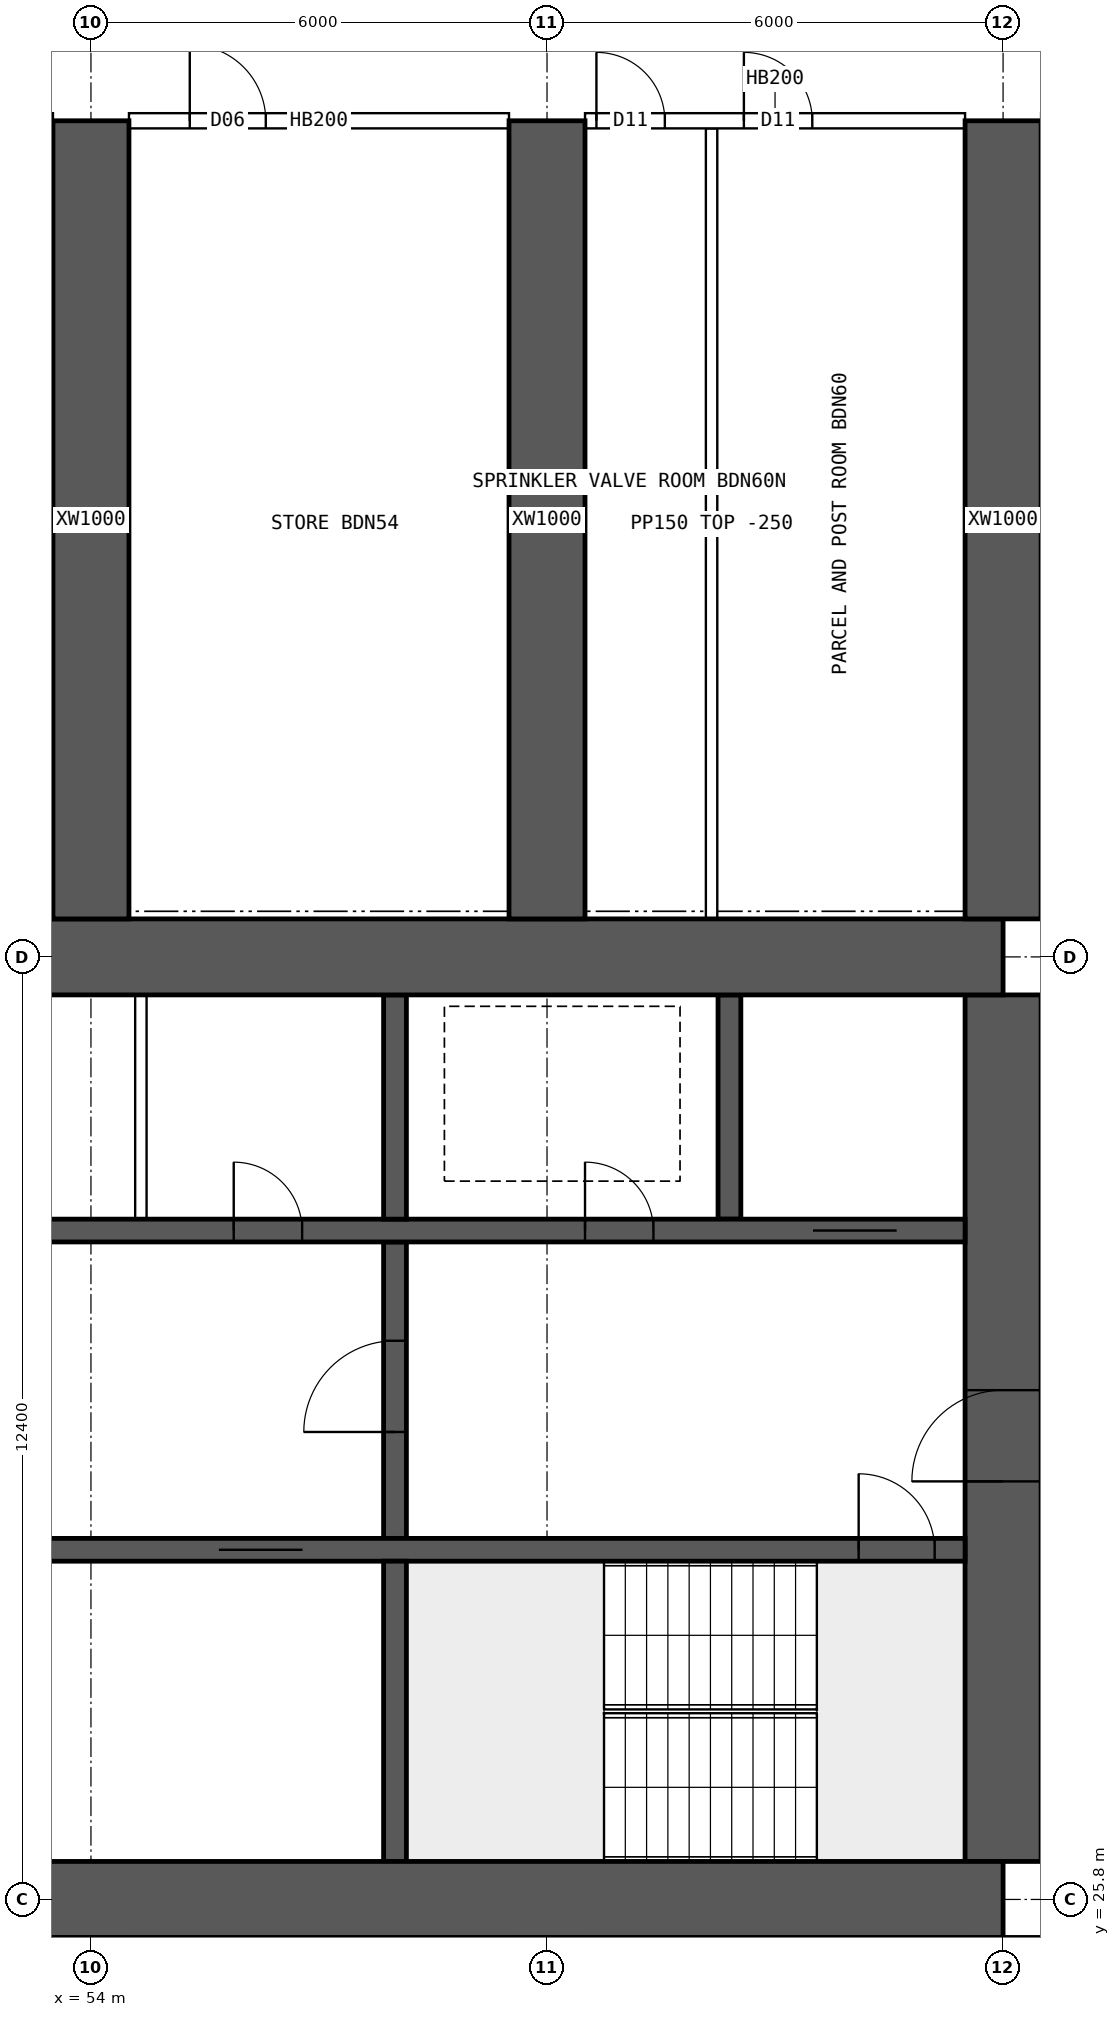
"""IFC4 building model, lengths in metres.
Left out: names, types, materials, properties, quantities, classifications, styles, units other than length and angle.
Written with IfcOpenShell. Run it as: python <this file> out.ifc"""

import sys

from ifc_helpers import new_model, si_unit, direction, frame, frame_2d, origin, place, context, subcontext, project, spatial, rectangle, extrude, element, fill, save


model = new_model("IFC4")
c1 = context("Model", 3, precision=1e-05, world=origin(), true_north=direction((0.0, 1.0)))
c2 = subcontext(c1, "Body", "Model", "MODEL_VIEW")
j1 = project(units=[si_unit("LENGTHUNIT", "METRE"), si_unit("PLANEANGLEUNIT", "RADIAN")], contexts=[c1])
p1 = place(None, origin())
s1 = spatial("IfcSite", under=j1, at=p1, CompositionType="ELEMENT")
p2 = place(p1, origin())
s2 = spatial("IfcBuilding", under=s1, at=p2, CompositionType="ELEMENT")
p3 = place(p2, frame((0.0, 0.0, 53.95)))
s3 = spatial("IfcBuildingStorey", under=s2, at=p3, CompositionType="ELEMENT", Elevation=53.95)
for number, where, z_axis, x_axis in (
    (1, (18.0, 25.8, 0.0), (0.0, 0.0, 1.0), (1.0, 0.0, 0.0)),
    (2, (18.0, 38.2, 0.0), (0.0, 0.0, 1.0), (1.0, 0.0, 0.0)),
):
    element("IfcWall", number, at=place(p3, frame(where, z_axis=z_axis, x_axis=x_axis)), inside=s3, PredefinedType="SHEAR", context=c2, shape_type="SweptSolid", body=[
        extrude(rectangle(XDim=48.0, YDim=1.0, at=frame_2d((24.0, 0.0))), origin(), (0.0, 0.0, 1.0), 3.75),
    ])
p4 = place(p3, frame((66.0, 26.3, 0.0), z_axis=(0.0, 0.0, 1.0), x_axis=(0.0, 1.0, 0.0)))
e3 = element("IfcWall", 3, at=p4, inside=s3, PredefinedType="SHEAR", context=c2, shape_type="SweptSolid", body=[
    extrude(rectangle(XDim=11.4, YDim=1.0, at=frame_2d((5.7, 0.0))), origin(), (0.0, 0.0, 1.0), 3.75),
])
p5 = place(p4, frame((5.0, 0.0, 0.0)))
e4 = element("IfcOpeningElement", 4, at=p5, cuts=e3, PredefinedType="OPENING", context=c2, shape_type="SweptSolid", body=[
    extrude(rectangle(XDim=1.2, YDim=2.1, at=frame_2d((0.6, 1.05))), frame((0.0, 0.51, 0.0), z_axis=(0.0, -1.0, 0.0), x_axis=(1.0, 0.0, 0.0)), (0.0, 0.0, 1.0), 1.02),
])
p6 = place(p3, frame((18.5, 30.4, 0.0), z_axis=(0.0, 0.0, 1.0), x_axis=(1.0, 0.0, 0.0)))
e5 = element("IfcWall", 5, at=p6, inside=s3, PredefinedType="SHEAR", context=c2, shape_type="SweptSolid", body=[
    extrude(rectangle(XDim=47.0, YDim=0.3, at=frame_2d((23.5, 0.0))), origin(), (0.0, 0.0, 1.0), 3.75),
])
p7 = place(p6, frame((0.4, 0.0, 0.0)))
e6 = element("IfcOpeningElement", 6, at=p7, cuts=e5, PredefinedType="OPENING", context=c2, shape_type="SweptSolid", body=[
    extrude(rectangle(XDim=1.0, YDim=2.1, at=frame_2d((0.5, 1.05))), frame((0.0, 0.16, 0.0), z_axis=(0.0, -1.0, 0.0), x_axis=(1.0, 0.0, 0.0)), (0.0, 0.0, 1.0), 0.32),
])
p8 = place(p6, frame((45.6, 0.0, 0.0)))
e7 = element("IfcOpeningElement", 7, at=p8, cuts=e5, PredefinedType="OPENING", context=c2, shape_type="SweptSolid", body=[
    extrude(rectangle(XDim=1.0, YDim=2.1, at=frame_2d((0.5, 1.05))), frame((0.0, 0.16, 0.0), z_axis=(0.0, -1.0, 0.0), x_axis=(1.0, 0.0, 0.0)), (0.0, 0.0, 1.0), 0.32),
])
p9 = place(p6, frame((8.25, 0.0, 0.0)))
e8 = element("IfcOpeningElement", 8, at=p9, cuts=e5, PredefinedType="OPENING", context=c2, shape_type="SweptSolid", body=[
    extrude(rectangle(XDim=1.1, YDim=2.1, at=frame_2d((0.55, 1.05))), frame((0.0, 0.16, 0.0), z_axis=(0.0, -1.0, 0.0), x_axis=(1.0, 0.0, 0.0)), (0.0, 0.0, 1.0), 0.32),
])
p10 = place(p6, frame((10.85, 0.0, 0.0)))
e9 = element("IfcOpeningElement", 9, at=p10, cuts=e5, PredefinedType="OPENING", context=c2, shape_type="SweptSolid", body=[
    extrude(rectangle(XDim=1.1, YDim=2.1, at=frame_2d((0.55, 1.05))), frame((0.0, 0.16, 0.0), z_axis=(0.0, -1.0, 0.0), x_axis=(1.0, 0.0, 0.0)), (0.0, 0.0, 1.0), 0.32),
])
p11 = place(p6, frame((13.45, 0.0, 0.0)))
e10 = element("IfcOpeningElement", 10, at=p11, cuts=e5, PredefinedType="OPENING", context=c2, shape_type="SweptSolid", body=[
    extrude(rectangle(XDim=1.1, YDim=2.1, at=frame_2d((0.55, 1.05))), frame((0.0, 0.16, 0.0), z_axis=(0.0, -1.0, 0.0), x_axis=(1.0, 0.0, 0.0)), (0.0, 0.0, 1.0), 0.32),
])
p12 = place(p6, frame((16.05, 0.0, 0.0)))
e11 = element("IfcOpeningElement", 11, at=p12, cuts=e5, PredefinedType="OPENING", context=c2, shape_type="SweptSolid", body=[
    extrude(rectangle(XDim=1.1, YDim=2.1, at=frame_2d((0.55, 1.05))), frame((0.0, 0.16, 0.0), z_axis=(0.0, -1.0, 0.0), x_axis=(1.0, 0.0, 0.0)), (0.0, 0.0, 1.0), 0.32),
])
p13 = place(p6, frame((30.117, 0.0, 0.0)))
e12 = element("IfcOpeningElement", 12, at=p13, cuts=e5, PredefinedType="OPENING", context=c2, shape_type="SweptSolid", body=[
    extrude(rectangle(XDim=1.1, YDim=2.1, at=frame_2d((0.55, 1.05))), frame((0.0, 0.16, 0.0), z_axis=(0.0, -1.0, 0.0), x_axis=(1.0, 0.0, 0.0)), (0.0, 0.0, 1.0), 0.32),
])
p14 = place(p6, frame((33.65, 0.0, 0.0)))
e13 = element("IfcOpeningElement", 13, at=p14, cuts=e5, PredefinedType="OPENING", context=c2, shape_type="SweptSolid", body=[
    extrude(rectangle(XDim=1.1, YDim=2.1, at=frame_2d((0.55, 1.05))), frame((0.0, 0.16, 0.0), z_axis=(0.0, -1.0, 0.0), x_axis=(1.0, 0.0, 0.0)), (0.0, 0.0, 1.0), 0.32),
])
p15 = place(p6, frame((37.183, 0.0, 0.0)))
e14 = element("IfcOpeningElement", 14, at=p15, cuts=e5, PredefinedType="OPENING", context=c2, shape_type="SweptSolid", body=[
    extrude(rectangle(XDim=1.1, YDim=2.1, at=frame_2d((0.55, 1.05))), frame((0.0, 0.16, 0.0), z_axis=(0.0, -1.0, 0.0), x_axis=(1.0, 0.0, 0.0)), (0.0, 0.0, 1.0), 0.32),
])
p16 = place(p3, frame((18.5, 34.6, 0.0), z_axis=(0.0, 0.0, 1.0), x_axis=(1.0, 0.0, 0.0)))
e15 = element("IfcWall", 15, at=p16, inside=s3, PredefinedType="SHEAR", context=c2, shape_type="SweptSolid", body=[
    extrude(rectangle(XDim=47.0, YDim=0.3, at=frame_2d((23.5, 0.0))), origin(), (0.0, 0.0, 1.0), 3.75),
])
p17 = place(p16, frame((0.9, 0.0, 0.0)))
e16 = element("IfcOpeningElement", 16, at=p17, cuts=e15, PredefinedType="OPENING", context=c2, shape_type="SweptSolid", body=[
    extrude(rectangle(XDim=1.1, YDim=2.1, at=frame_2d((0.55, 1.05))), frame((0.0, 0.16, 0.0), z_axis=(0.0, -1.0, 0.0), x_axis=(1.0, 0.0, 0.0)), (0.0, 0.0, 1.0), 0.32),
])
p18 = place(p16, frame((45.0, 0.0, 0.0)))
e17 = element("IfcOpeningElement", 17, at=p18, cuts=e15, PredefinedType="OPENING", context=c2, shape_type="SweptSolid", body=[
    extrude(rectangle(XDim=1.1, YDim=2.1, at=frame_2d((0.55, 1.05))), frame((0.0, 0.16, 0.0), z_axis=(0.0, -1.0, 0.0), x_axis=(1.0, 0.0, 0.0)), (0.0, 0.0, 1.0), 0.32),
])
p19 = place(p16, frame((4.1, 0.0, 0.0)))
e18 = element("IfcOpeningElement", 18, at=p19, cuts=e15, PredefinedType="OPENING", context=c2, shape_type="SweptSolid", body=[
    extrude(rectangle(XDim=0.9, YDim=2.1, at=frame_2d((0.45, 1.05))), frame((0.0, 0.16, 0.0), z_axis=(0.0, -1.0, 0.0), x_axis=(1.0, 0.0, 0.0)), (0.0, 0.0, 1.0), 0.32),
])
p20 = place(p16, frame((42.0, 0.0, 0.0)))
e19 = element("IfcOpeningElement", 19, at=p20, cuts=e15, PredefinedType="OPENING", context=c2, shape_type="SweptSolid", body=[
    extrude(rectangle(XDim=0.9, YDim=2.1, at=frame_2d((0.45, 1.05))), frame((0.0, 0.16, 0.0), z_axis=(0.0, -1.0, 0.0), x_axis=(1.0, 0.0, 0.0)), (0.0, 0.0, 1.0), 0.32),
])
p21 = place(p16, frame((8.875, 0.0, 0.0)))
e20 = element("IfcOpeningElement", 20, at=p21, cuts=e15, PredefinedType="OPENING", context=c2, shape_type="SweptSolid", body=[
    extrude(rectangle(XDim=0.9, YDim=2.1, at=frame_2d((0.45, 1.05))), frame((0.0, 0.16, 0.0), z_axis=(0.0, -1.0, 0.0), x_axis=(1.0, 0.0, 0.0)), (0.0, 0.0, 1.0), 0.32),
])
p22 = place(p16, frame((12.849, 0.0, 0.0)))
e21 = element("IfcOpeningElement", 21, at=p22, cuts=e15, PredefinedType="OPENING", context=c2, shape_type="SweptSolid", body=[
    extrude(rectangle(XDim=0.9, YDim=2.1, at=frame_2d((0.45, 1.05))), frame((0.0, 0.16, 0.0), z_axis=(0.0, -1.0, 0.0), x_axis=(1.0, 0.0, 0.0)), (0.0, 0.0, 1.0), 0.32),
])
p23 = place(p16, frame((16.496, 0.0, 0.0)))
e22 = element("IfcOpeningElement", 22, at=p23, cuts=e15, PredefinedType="OPENING", context=c2, shape_type="SweptSolid", body=[
    extrude(rectangle(XDim=0.9, YDim=2.1, at=frame_2d((0.45, 1.05))), frame((0.0, 0.16, 0.0), z_axis=(0.0, -1.0, 0.0), x_axis=(1.0, 0.0, 0.0)), (0.0, 0.0, 1.0), 0.32),
])
p24 = place(p16, frame((20.255, 0.0, 0.0)))
e23 = element("IfcOpeningElement", 23, at=p24, cuts=e15, PredefinedType="OPENING", context=c2, shape_type="SweptSolid", body=[
    extrude(rectangle(XDim=0.9, YDim=2.1, at=frame_2d((0.45, 1.05))), frame((0.0, 0.16, 0.0), z_axis=(0.0, -1.0, 0.0), x_axis=(1.0, 0.0, 0.0)), (0.0, 0.0, 1.0), 0.32),
])
p25 = place(p16, frame((24.661, 0.0, 0.0)))
e24 = element("IfcOpeningElement", 24, at=p25, cuts=e15, PredefinedType="OPENING", context=c2, shape_type="SweptSolid", body=[
    extrude(rectangle(XDim=0.9, YDim=2.1, at=frame_2d((0.45, 1.05))), frame((0.0, 0.16, 0.0), z_axis=(0.0, -1.0, 0.0), x_axis=(1.0, 0.0, 0.0)), (0.0, 0.0, 1.0), 0.32),
])
p26 = place(p16, frame((27.458, 0.0, 0.0)))
e25 = element("IfcOpeningElement", 25, at=p26, cuts=e15, PredefinedType="OPENING", context=c2, shape_type="SweptSolid", body=[
    extrude(rectangle(XDim=0.9, YDim=2.1, at=frame_2d((0.45, 1.05))), frame((0.0, 0.16, 0.0), z_axis=(0.0, -1.0, 0.0), x_axis=(1.0, 0.0, 0.0)), (0.0, 0.0, 1.0), 0.32),
])
p27 = place(p16, frame((29.628, 0.0, 0.0)))
e26 = element("IfcOpeningElement", 26, at=p27, cuts=e15, PredefinedType="OPENING", context=c2, shape_type="SweptSolid", body=[
    extrude(rectangle(XDim=0.9, YDim=2.1, at=frame_2d((0.45, 1.05))), frame((0.0, 0.16, 0.0), z_axis=(0.0, -1.0, 0.0), x_axis=(1.0, 0.0, 0.0)), (0.0, 0.0, 1.0), 0.32),
])
p28 = place(p16, frame((33.427, 0.0, 0.0)))
e27 = element("IfcOpeningElement", 27, at=p28, cuts=e15, PredefinedType="OPENING", context=c2, shape_type="SweptSolid", body=[
    extrude(rectangle(XDim=0.9, YDim=2.1, at=frame_2d((0.45, 1.05))), frame((0.0, 0.16, 0.0), z_axis=(0.0, -1.0, 0.0), x_axis=(1.0, 0.0, 0.0)), (0.0, 0.0, 1.0), 0.32),
])
p29 = place(p16, frame((37.378, 0.0, 0.0)))
e28 = element("IfcOpeningElement", 28, at=p29, cuts=e15, PredefinedType="OPENING", context=c2, shape_type="SweptSolid", body=[
    extrude(rectangle(XDim=0.9, YDim=2.1, at=frame_2d((0.45, 1.05))), frame((0.0, 0.16, 0.0), z_axis=(0.0, -1.0, 0.0), x_axis=(1.0, 0.0, 0.0)), (0.0, 0.0, 1.0), 0.32),
])
p30 = place(p3, frame((58.0, 26.3, 0.0), z_axis=(0.0, 0.0, 1.0), x_axis=(0.0, 1.0, 0.0)))
e29 = element("IfcWall", 29, at=p30, inside=s3, PredefinedType="SHEAR", context=c2, shape_type="SweptSolid", body=[
    extrude(rectangle(XDim=3.95, YDim=0.3, at=frame_2d((1.975, 0.0))), origin(), (0.0, 0.0, 1.0), 3.75),
])
p31 = place(p3, frame((58.0, 30.55, 0.0), z_axis=(0.0, 0.0, 1.0), x_axis=(0.0, 1.0, 0.0)))
e30 = element("IfcWall", 30, at=p31, inside=s3, PredefinedType="SHEAR", context=c2, shape_type="SweptSolid", body=[
    extrude(rectangle(XDim=3.9, YDim=0.3, at=frame_2d((1.95, 0.0))), origin(), (0.0, 0.0, 1.0), 3.75),
])
p32 = place(p31, frame((1.4, 0.0, 0.0)))
e31 = element("IfcOpeningElement", 31, at=p32, cuts=e30, PredefinedType="OPENING", context=c2, shape_type="SweptSolid", body=[
    extrude(rectangle(XDim=1.2, YDim=2.1, at=frame_2d((0.6, 1.05))), frame((0.0, 0.16, 0.0), z_axis=(0.0, -1.0, 0.0), x_axis=(1.0, 0.0, 0.0)), (0.0, 0.0, 1.0), 0.32),
])
for number, where, z_axis, x_axis in (
    (32, (62.4, 34.75, 0.0), (0.0, 0.0, 1.0), (0.0, 1.0, 0.0)),
    (33, (58.0, 34.75, 0.0), (0.0, 0.0, 1.0), (0.0, 1.0, 0.0)),
):
    element("IfcWall", number, at=place(p3, frame(where, z_axis=z_axis, x_axis=x_axis)), inside=s3, PredefinedType="SHEAR", context=c2, shape_type="SweptSolid", body=[
        extrude(rectangle(XDim=2.95, YDim=0.3, at=frame_2d((1.475, 0.0))), origin(), (0.0, 0.0, 1.0), 3.75),
    ])
for number, where, z_axis, x_axis in (
    (34, (54.0, 38.7, 0.0), (0.0, 0.0, 1.0), (0.0, 1.0, 0.0)),
    (35, (60.0, 38.7, 0.0), (0.0, 0.0, 1.0), (0.0, 1.0, 0.0)),
    (36, (66.0, 38.7, 0.0), (0.0, 0.0, 1.0), (0.0, 1.0, 0.0)),
):
    element("IfcWall", number, at=place(p3, frame(where, z_axis=z_axis, x_axis=x_axis)), inside=s3, PredefinedType="SHEAR", context=c2, shape_type="SweptSolid", body=[
        extrude(rectangle(XDim=10.5, YDim=1.0, at=frame_2d((5.25, 0.0))), origin(), (0.0, 0.0, 1.0), 3.75),
    ])
p33 = place(p3, frame((54.657, 34.75, 0.0), z_axis=(0.0, 0.0, 1.0), x_axis=(0.0, 1.0, 0.0)))
e37 = element("IfcWall", 37, at=p33, inside=s3, PredefinedType="SOLIDWALL", context=c2, shape_type="SweptSolid", body=[
    extrude(rectangle(XDim=2.95, YDim=0.15, at=frame_2d((1.475, 0.0))), origin(), (0.0, 0.0, 1.0), 3.5),
])
p34 = place(p3, frame((54.5, 49.2, 0.0), z_axis=(0.0, 0.0, 1.0), x_axis=(1.0, 0.0, 0.0)))
e38 = element("IfcWall", 38, at=p34, inside=s3, PredefinedType="SOLIDWALL", context=c2, shape_type="SweptSolid", body=[
    extrude(rectangle(XDim=5.0, YDim=0.2, at=frame_2d((2.5, 0.0))), origin(), (0.0, 0.0, 1.0), 3.5),
])
p35 = place(p34, frame((0.8, 0.0, 0.0)))
e39 = element("IfcOpeningElement", 39, at=p35, cuts=e38, PredefinedType="OPENING", context=c2, shape_type="SweptSolid", body=[
    extrude(rectangle(XDim=1.0, YDim=2.1, at=frame_2d((0.5, 1.05))), frame((0.0, 0.11, 0.0), z_axis=(0.0, -1.0, 0.0), x_axis=(1.0, 0.0, 0.0)), (0.0, 0.0, 1.0), 0.22),
])
p36 = place(p3, frame((60.5, 49.2, 0.0), z_axis=(0.0, 0.0, 1.0), x_axis=(1.0, 0.0, 0.0)))
e40 = element("IfcWall", 40, at=p36, inside=s3, PredefinedType="SOLIDWALL", context=c2, shape_type="SweptSolid", body=[
    extrude(rectangle(XDim=5.0, YDim=0.2, at=frame_2d((2.5, 0.0))), origin(), (0.0, 0.0, 1.0), 3.5),
])
p37 = place(p36, frame((0.15, 0.0, 0.0)))
e41 = element("IfcOpeningElement", 41, at=p37, cuts=e40, PredefinedType="OPENING", context=c2, shape_type="SweptSolid", body=[
    extrude(rectangle(XDim=0.9, YDim=2.1, at=frame_2d((0.45, 1.05))), frame((0.0, 0.11, 0.0), z_axis=(0.0, -1.0, 0.0), x_axis=(1.0, 0.0, 0.0)), (0.0, 0.0, 1.0), 0.22),
])
p38 = place(p36, frame((2.09, 0.0, 0.0)))
e42 = element("IfcOpeningElement", 42, at=p38, cuts=e40, PredefinedType="OPENING", context=c2, shape_type="SweptSolid", body=[
    extrude(rectangle(XDim=0.9, YDim=2.1, at=frame_2d((0.45, 1.05))), frame((0.0, 0.11, 0.0), z_axis=(0.0, -1.0, 0.0), x_axis=(1.0, 0.0, 0.0)), (0.0, 0.0, 1.0), 0.22),
])
for number, where, z_axis, x_axis in (
    (43, (56.66, 14.9, 0.0), (0.0, 0.0, 1.0), (0.0, 1.0, 0.0)),
    (44, (62.095, 14.9, 0.0), (0.0, 0.0, 1.0), (0.0, 1.0, 0.0)),
    (45, (62.165, 38.7, 0.0), (0.0, 0.0, 1.0), (0.0, 1.0, 0.0)),
):
    element("IfcWall", number, at=place(p3, frame(where, z_axis=z_axis, x_axis=x_axis)), inside=s3, PredefinedType="PARTITIONING", context=c2, shape_type="SweptSolid", body=[
        extrude(rectangle(XDim=10.4, YDim=0.15, at=frame_2d((5.2, 0.0))), origin(), (0.0, 0.0, 1.0), 3.5),
    ])
p39 = place(p5, origin())
e46 = element("IfcDoor", 46, at=p39, inside=s3, OperationType="SINGLE_SWING_LEFT", PredefinedType="DOOR", context=c2, shape_type="SweptSolid", body=[
    extrude(rectangle(XDim=1.2, YDim=2.1, at=frame_2d((0.6, 1.05))), frame((0.0, 0.025, 0.0), z_axis=(0.0, -1.0, 0.0), x_axis=(1.0, 0.0, 0.0)), (0.0, 0.0, 1.0), 0.05),
])
fill(e4, e46)
p40 = place(p8, origin())
e47 = element("IfcDoor", 47, at=p40, inside=s3, OperationType="SINGLE_SWING_LEFT", PredefinedType="DOOR", context=c2, shape_type="SweptSolid", body=[
    extrude(rectangle(XDim=1.0, YDim=2.1, at=frame_2d((0.5, 1.05))), frame((0.0, 0.025, 0.0), z_axis=(0.0, -1.0, 0.0), x_axis=(1.0, 0.0, 0.0)), (0.0, 0.0, 1.0), 0.05),
])
fill(e7, e47)
p41 = place(p18, origin())
e48 = element("IfcDoor", 48, at=p41, inside=s3, OperationType="DOUBLE_DOOR_SLIDING", PredefinedType="DOOR", context=c2, shape_type="SweptSolid", body=[
    extrude(rectangle(XDim=1.1, YDim=2.1, at=frame_2d((0.55, 1.05))), frame((0.0, 0.025, 0.0), z_axis=(0.0, -1.0, 0.0), x_axis=(1.0, 0.0, 0.0)), (0.0, 0.0, 1.0), 0.05),
])
fill(e17, e48)
p42 = place(p20, origin())
e49 = element("IfcDoor", 49, at=p42, inside=s3, OperationType="SINGLE_SWING_LEFT", PredefinedType="DOOR", context=c2, shape_type="SweptSolid", body=[
    extrude(rectangle(XDim=0.9, YDim=2.1, at=frame_2d((0.45, 1.05))), frame((0.0, 0.025, 0.0), z_axis=(0.0, -1.0, 0.0), x_axis=(1.0, 0.0, 0.0)), (0.0, 0.0, 1.0), 0.05),
])
fill(e19, e49)
p43 = place(p32, origin())
e50 = element("IfcDoor", 50, at=p43, inside=s3, OperationType="SINGLE_SWING_LEFT", PredefinedType="DOOR", context=c2, shape_type="SweptSolid", body=[
    extrude(rectangle(XDim=1.2, YDim=2.1, at=frame_2d((0.6, 1.05))), frame((0.0, 0.025, 0.0), z_axis=(0.0, -1.0, 0.0), x_axis=(1.0, 0.0, 0.0)), (0.0, 0.0, 1.0), 0.05),
])
fill(e31, e50)
p44 = place(p29, origin())
e51 = element("IfcDoor", 51, at=p44, inside=s3, OperationType="SINGLE_SWING_LEFT", PredefinedType="DOOR", context=c2, shape_type="SweptSolid", body=[
    extrude(rectangle(XDim=0.9, YDim=2.1, at=frame_2d((0.45, 1.05))), frame((0.0, 0.025, 0.0), z_axis=(0.0, -1.0, 0.0), x_axis=(1.0, 0.0, 0.0)), (0.0, 0.0, 1.0), 0.05),
])
fill(e28, e51)
p45 = place(p15, origin())
e52 = element("IfcDoor", 52, at=p45, inside=s3, OperationType="DOUBLE_DOOR_SLIDING", PredefinedType="DOOR", context=c2, shape_type="SweptSolid", body=[
    extrude(rectangle(XDim=1.1, YDim=2.1, at=frame_2d((0.55, 1.05))), frame((0.0, 0.025, 0.0), z_axis=(0.0, -1.0, 0.0), x_axis=(1.0, 0.0, 0.0)), (0.0, 0.0, 1.0), 0.05),
])
fill(e14, e52)
p46 = place(p35, origin())
e53 = element("IfcDoor", 53, at=p46, inside=s3, OperationType="SINGLE_SWING_LEFT", PredefinedType="DOOR", context=c2, shape_type="SweptSolid", body=[
    extrude(rectangle(XDim=1.0, YDim=2.1, at=frame_2d((0.5, 1.05))), frame((0.0, 0.025, 0.0), z_axis=(0.0, -1.0, 0.0), x_axis=(1.0, 0.0, 0.0)), (0.0, 0.0, 1.0), 0.05),
])
fill(e39, e53)
p47 = place(p37, origin())
e54 = element("IfcDoor", 54, at=p47, inside=s3, OperationType="SINGLE_SWING_LEFT", PredefinedType="DOOR", context=c2, shape_type="SweptSolid", body=[
    extrude(rectangle(XDim=0.9, YDim=2.1, at=frame_2d((0.45, 1.05))), frame((0.0, 0.025, 0.0), z_axis=(0.0, -1.0, 0.0), x_axis=(1.0, 0.0, 0.0)), (0.0, 0.0, 1.0), 0.05),
])
fill(e41, e54)
p48 = place(p38, origin())
e55 = element("IfcDoor", 55, at=p48, inside=s3, OperationType="SINGLE_SWING_LEFT", PredefinedType="DOOR", context=c2, shape_type="SweptSolid", body=[
    extrude(rectangle(XDim=0.9, YDim=2.1, at=frame_2d((0.45, 1.05))), frame((0.0, 0.025, 0.0), z_axis=(0.0, -1.0, 0.0), x_axis=(1.0, 0.0, 0.0)), (0.0, 0.0, 1.0), 0.05),
])
fill(e42, e55)
save(model, sys.argv[1])
